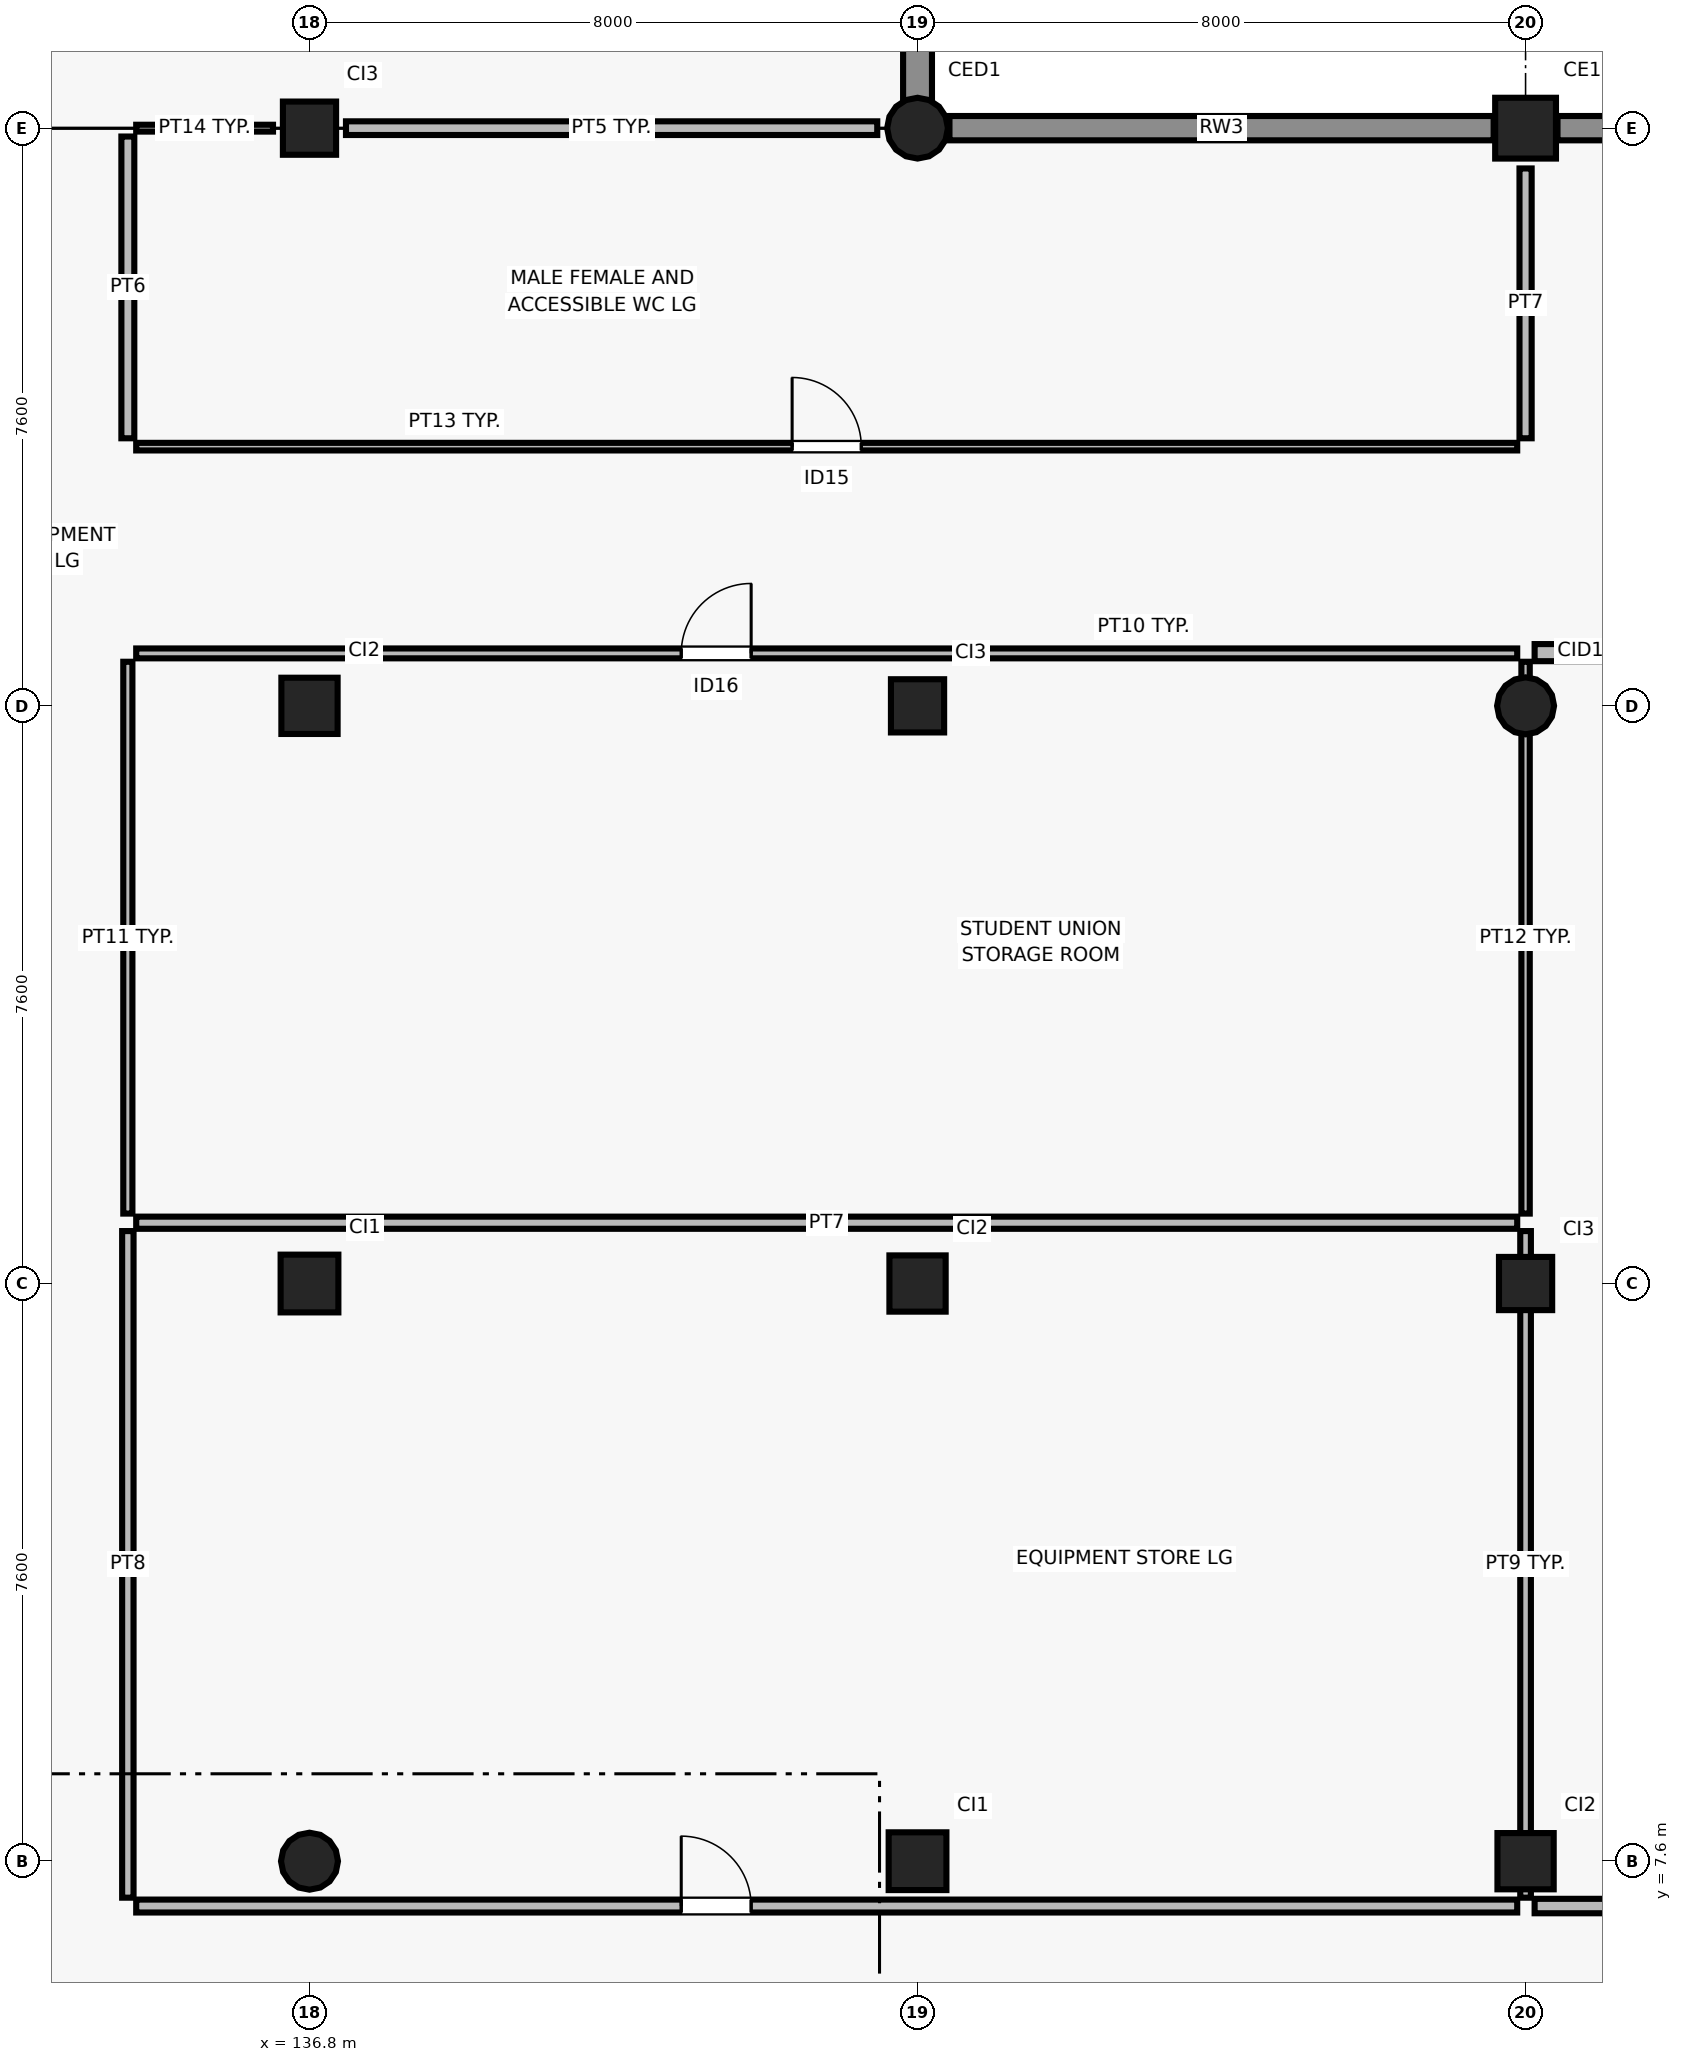
"""IFC4 building model, lengths in metres.
Left out: names, types, materials, properties, quantities, classifications, styles, units other than length and angle.
Written with IfcOpenShell. Run it as: python <this file> out.ifc"""

import sys

from ifc_helpers import new_model, si_unit, direction, frame, frame_2d, origin, origin_2d, place, context, subcontext, project, spatial, rectangle, circle, extrude, element, fill, save


model = new_model("IFC4")
c1 = context("Model", 3, precision=1e-05, world=origin(), true_north=direction((0.0, 1.0)))
c2 = subcontext(c1, "Body", "Model", "MODEL_VIEW")
j1 = project(units=[si_unit("LENGTHUNIT", "METRE"), si_unit("PLANEANGLEUNIT", "RADIAN")], contexts=[c1])
p1 = place(None, origin())
s1 = spatial("IfcSite", under=j1, at=p1, CompositionType="ELEMENT")
p2 = place(p1, origin())
s2 = spatial("IfcBuilding", under=s1, at=p2, CompositionType="ELEMENT")
p3 = place(p2, frame((0.0, 0.0, -4.2)))
s3 = spatial("IfcBuildingStorey", under=s2, at=p3, CompositionType="ELEMENT", Elevation=-4.2)
for number, where, z_axis, x_axis in (
    (1, (145.22, 30.4, 0.0), (0.0, 0.0, 1.0), (1.0, 0.0, 0.0)),
    (2, (153.22, 30.4, 0.0), (0.0, 0.0, 1.0), (1.0, 0.0, 0.0)),
):
    element("IfcWall", number, at=place(p3, frame(where, z_axis=z_axis, x_axis=x_axis)), inside=s3, PredefinedType="USERDEFINED", context=c2, shape_type="SweptSolid", body=[
        extrude(rectangle(XDim=7.16, YDim=0.32, at=frame_2d((3.58, 0.0))), origin(), (0.0, 0.0, 1.0), 3.25),
    ])
p4 = place(p3, frame((136.8, 7.6, 0.0), z_axis=(0.0, 0.0, 1.0), x_axis=(1.0, 0.0, 0.0)))
e3 = element("IfcColumn", 3, at=p4, inside=s3, PredefinedType="COLUMN", context=c2, shape_type="SweptSolid", body=[
    extrude(circle(Radius=0.375, at=origin_2d()), origin(), (0.0, 0.0, 1.0), 4.2),
])
p5 = place(p3, frame((136.8, 15.2, 0.0), z_axis=(0.0, 0.0, 1.0), x_axis=(1.0, 0.0, 0.0)))
e4 = element("IfcColumn", 4, at=p5, inside=s3, PredefinedType="COLUMN", context=c2, shape_type="SweptSolid", body=[
    extrude(rectangle(XDim=0.76, YDim=0.76, at=origin_2d()), origin(), (0.0, 0.0, 1.0), 4.2),
])
p6 = place(p3, frame((136.8, 22.8, 0.0), z_axis=(0.0, 0.0, 1.0), x_axis=(1.0, 0.0, 0.0)))
e5 = element("IfcColumn", 5, at=p6, inside=s3, PredefinedType="COLUMN", context=c2, shape_type="SweptSolid", body=[
    extrude(rectangle(XDim=0.74, YDim=0.74, at=origin_2d()), origin(), (0.0, 0.0, 1.0), 4.2),
])
p7 = place(p3, frame((136.8, 30.4, 0.0), z_axis=(0.0, 0.0, 1.0), x_axis=(1.0, 0.0, 0.0)))
e6 = element("IfcColumn", 6, at=p7, inside=s3, PredefinedType="COLUMN", context=c2, shape_type="SweptSolid", body=[
    extrude(rectangle(XDim=0.7, YDim=0.7, at=origin_2d()), origin(), (0.0, 0.0, 1.0), 4.2),
])
p8 = place(p3, frame((144.8, 7.6, 0.0), z_axis=(0.0, 0.0, 1.0), x_axis=(1.0, 0.0, 0.0)))
e7 = element("IfcColumn", 7, at=p8, inside=s3, PredefinedType="COLUMN", context=c2, shape_type="SweptSolid", body=[
    extrude(rectangle(XDim=0.76, YDim=0.76, at=origin_2d()), origin(), (0.0, 0.0, 1.0), 4.2),
])
p9 = place(p3, frame((144.8, 15.2, 0.0), z_axis=(0.0, 0.0, 1.0), x_axis=(1.0, 0.0, 0.0)))
e8 = element("IfcColumn", 8, at=p9, inside=s3, PredefinedType="COLUMN", context=c2, shape_type="SweptSolid", body=[
    extrude(rectangle(XDim=0.74, YDim=0.74, at=origin_2d()), origin(), (0.0, 0.0, 1.0), 4.2),
])
p10 = place(p3, frame((144.8, 22.8, 0.0), z_axis=(0.0, 0.0, 1.0), x_axis=(1.0, 0.0, 0.0)))
e9 = element("IfcColumn", 9, at=p10, inside=s3, PredefinedType="COLUMN", context=c2, shape_type="SweptSolid", body=[
    extrude(rectangle(XDim=0.7, YDim=0.7, at=origin_2d()), origin(), (0.0, 0.0, 1.0), 4.2),
])
p11 = place(p3, frame((144.8, 30.4, 0.0), z_axis=(0.0, 0.0, 1.0), x_axis=(1.0, 0.0, 0.0)))
e10 = element("IfcColumn", 10, at=p11, inside=s3, PredefinedType="COLUMN", context=c2, shape_type="SweptSolid", body=[
    extrude(circle(Radius=0.4, at=origin_2d()), origin(), (0.0, 0.0, 1.0), 4.2),
])
p12 = place(p3, frame((152.8, 7.6, 0.0), z_axis=(0.0, 0.0, 1.0), x_axis=(1.0, 0.0, 0.0)))
e11 = element("IfcColumn", 11, at=p12, inside=s3, PredefinedType="COLUMN", context=c2, shape_type="SweptSolid", body=[
    extrude(rectangle(XDim=0.74, YDim=0.74, at=origin_2d()), origin(), (0.0, 0.0, 1.0), 4.2),
])
p13 = place(p3, frame((152.8, 15.2, 0.0), z_axis=(0.0, 0.0, 1.0), x_axis=(1.0, 0.0, 0.0)))
e12 = element("IfcColumn", 12, at=p13, inside=s3, PredefinedType="COLUMN", context=c2, shape_type="SweptSolid", body=[
    extrude(rectangle(XDim=0.7, YDim=0.7, at=origin_2d()), origin(), (0.0, 0.0, 1.0), 4.2),
])
p14 = place(p3, frame((152.8, 22.8, 0.0), z_axis=(0.0, 0.0, 1.0), x_axis=(1.0, 0.0, 0.0)))
e13 = element("IfcColumn", 13, at=p14, inside=s3, PredefinedType="COLUMN", context=c2, shape_type="SweptSolid", body=[
    extrude(circle(Radius=0.375, at=origin_2d()), origin(), (0.0, 0.0, 1.0), 4.2),
])
p15 = place(p3, frame((152.8, 30.4, 0.0), z_axis=(0.0, 0.0, 1.0), x_axis=(1.0, 0.0, 0.0)))
e14 = element("IfcColumn", 14, at=p15, inside=s3, PredefinedType="COLUMN", context=c2, shape_type="SweptSolid", body=[
    extrude(rectangle(XDim=0.8, YDim=0.8, at=origin_2d()), origin(), (0.0, 0.0, 1.0), 4.2),
])
p16 = place(p3, frame((144.8, 30.736, 0.0), z_axis=(0.0, 0.0, 1.0), x_axis=(0.0, 1.0, 0.0)))
e15 = element("IfcWall", 15, at=p16, inside=s3, PredefinedType="SOLIDWALL", context=c2, shape_type="SweptSolid", body=[
    extrude(rectangle(XDim=6.869, YDim=0.38, at=frame_2d((3.435, 0.0))), origin(), (0.0, 0.0, 1.0), 3.275),
])
p17 = place(p16, frame((2.084, 0.0, 0.9)))
e16 = element("IfcOpeningElement", 16, at=p17, cuts=e15, PredefinedType="OPENING", context=c2, shape_type="SweptSolid", body=[
    extrude(rectangle(XDim=2.7, YDim=1.8, at=frame_2d((1.35, 0.9))), frame((0.0, 0.2, 0.0), z_axis=(0.0, -1.0, 0.0), x_axis=(1.0, 0.0, 0.0)), (0.0, 0.0, 1.0), 0.4),
])
p18 = place(p3, frame((134.52, 7.01, 0.0), z_axis=(0.0, 0.0, 1.0), x_axis=(1.0, 0.0, 0.0)))
e17 = element("IfcWall", 17, at=p18, inside=s3, PredefinedType="PARTITIONING", context=c2, shape_type="SweptSolid", body=[
    extrude(rectangle(XDim=18.17, YDim=0.17, at=frame_2d((9.085, 0.0))), origin(), (0.0, 0.0, 1.0), 3.9),
])
p19 = place(p18, frame((7.171, 0.0, 0.0)))
e18 = element("IfcOpeningElement", 18, at=p19, cuts=e17, PredefinedType="OPENING", context=c2, shape_type="SweptSolid", body=[
    extrude(rectangle(XDim=0.92, YDim=2.1, at=frame_2d((0.46, 1.05))), frame((0.0, 0.095, 0.0), z_axis=(0.0, -1.0, 0.0), x_axis=(1.0, 0.0, 0.0)), (0.0, 0.0, 1.0), 0.19),
])
p20 = place(p3, frame((134.52, 16.0, 0.0), z_axis=(0.0, 0.0, 1.0), x_axis=(1.0, 0.0, 0.0)))
e19 = element("IfcWall", 19, at=p20, inside=s3, PredefinedType="PARTITIONING", context=c2, shape_type="SweptSolid", body=[
    extrude(rectangle(XDim=18.17, YDim=0.16, at=frame_2d((9.085, 0.0))), origin(), (0.0, 0.0, 1.0), 3.9),
])
p21 = place(p3, frame((134.41, 7.12, 0.0), z_axis=(0.0, 0.0, 1.0), x_axis=(0.0, 1.0, 0.0)))
e20 = element("IfcWall", 20, at=p21, inside=s3, PredefinedType="PARTITIONING", context=c2, shape_type="SweptSolid", body=[
    extrude(rectangle(XDim=8.77, YDim=0.15, at=frame_2d((4.385, 0.0))), origin(), (0.0, 0.0, 1.0), 3.9),
])
p22 = place(p3, frame((152.8, 7.12, 0.0), z_axis=(0.0, 0.0, 1.0), x_axis=(0.0, 1.0, 0.0)))
e21 = element("IfcWall", 21, at=p22, inside=s3, PredefinedType="PARTITIONING", context=c2, shape_type="SweptSolid", body=[
    extrude(rectangle(XDim=8.77, YDim=0.14, at=frame_2d((4.385, 0.0))), origin(), (0.0, 0.0, 1.0), 3.315),
])
p23 = place(p3, frame((134.52, 23.49, 0.0), z_axis=(0.0, 0.0, 1.0), x_axis=(1.0, 0.0, 0.0)))
e22 = element("IfcWall", 22, at=p23, inside=s3, PredefinedType="PARTITIONING", context=c2, shape_type="SweptSolid", body=[
    extrude(rectangle(XDim=18.17, YDim=0.13, at=frame_2d((9.085, 0.0))), origin(), (0.0, 0.0, 1.0), 3.9),
])
p24 = place(p23, frame((7.171, 0.0, 0.0)))
e23 = element("IfcOpeningElement", 23, at=p24, cuts=e22, PredefinedType="OPENING", context=c2, shape_type="SweptSolid", body=[
    extrude(rectangle(XDim=0.92, YDim=2.1, at=frame_2d((0.46, 1.05))), frame((0.0, 0.075, 0.0), z_axis=(0.0, -1.0, 0.0), x_axis=(1.0, 0.0, 0.0)), (0.0, 0.0, 1.0), 0.15),
])
p25 = place(p3, frame((134.41, 16.12, 0.0), z_axis=(0.0, 0.0, 1.0), x_axis=(0.0, 1.0, 0.0)))
e24 = element("IfcWall", 24, at=p25, inside=s3, PredefinedType="PARTITIONING", context=c2, shape_type="SweptSolid", body=[
    extrude(rectangle(XDim=7.26, YDim=0.12, at=frame_2d((3.63, 0.0))), origin(), (0.0, 0.0, 1.0), 3.9),
])
p26 = place(p3, frame((152.8, 16.12, 0.0), z_axis=(0.0, 0.0, 1.0), x_axis=(0.0, 1.0, 0.0)))
e25 = element("IfcWall", 25, at=p26, inside=s3, PredefinedType="PARTITIONING", context=c2, shape_type="SweptSolid", body=[
    extrude(rectangle(XDim=7.26, YDim=0.11, at=frame_2d((3.63, 0.0))), origin(), (0.0, 0.0, 1.0), 3.345),
])
p27 = place(p3, frame((134.52, 26.21, 0.0), z_axis=(0.0, 0.0, 1.0), x_axis=(1.0, 0.0, 0.0)))
e26 = element("IfcWall", 26, at=p27, inside=s3, PredefinedType="PARTITIONING", context=c2, shape_type="SweptSolid", body=[
    extrude(rectangle(XDim=18.17, YDim=0.1, at=frame_2d((9.085, 0.0))), origin(), (0.0, 0.0, 1.0), 3.9),
])
p28 = place(p27, frame((8.63, 0.0, 0.0)))
e27 = element("IfcOpeningElement", 27, at=p28, cuts=e26, PredefinedType="OPENING", context=c2, shape_type="SweptSolid", body=[
    extrude(rectangle(XDim=0.91, YDim=2.1, at=frame_2d((0.455, 1.05))), frame((0.0, 0.06, 0.0), z_axis=(0.0, -1.0, 0.0), x_axis=(1.0, 0.0, 0.0)), (0.0, 0.0, 1.0), 0.12),
])
p29 = place(p3, frame((134.52, 30.4, 0.0), z_axis=(0.0, 0.0, 1.0), x_axis=(1.0, 0.0, 0.0)))
e28 = element("IfcWall", 28, at=p29, inside=s3, PredefinedType="PARTITIONING", context=c2, shape_type="SweptSolid", body=[
    extrude(rectangle(XDim=1.8, YDim=0.09, at=frame_2d((0.9, 0.0))), origin(), (0.0, 0.0, 1.0), 3.9),
])
p30 = place(p3, frame((137.28, 30.4, 0.0), z_axis=(0.0, 0.0, 1.0), x_axis=(1.0, 0.0, 0.0)))
e29 = element("IfcWall", 29, at=p30, inside=s3, PredefinedType="PARTITIONING", context=c2, shape_type="SweptSolid", body=[
    extrude(rectangle(XDim=6.99, YDim=0.18, at=frame_2d((3.495, 0.0))), origin(), (0.0, 0.0, 1.0), 3.045),
])
p31 = place(p3, frame((134.41, 26.32, 0.0), z_axis=(0.0, 0.0, 1.0), x_axis=(0.0, 1.0, 0.0)))
e30 = element("IfcWall", 30, at=p31, inside=s3, PredefinedType="PARTITIONING", context=c2, shape_type="SweptSolid", body=[
    extrude(rectangle(XDim=3.97, YDim=0.17, at=frame_2d((1.985, 0.0))), origin(), (0.0, 0.0, 1.0), 3.9),
])
p32 = place(p3, frame((152.8, 26.32, 0.0), z_axis=(0.0, 0.0, 1.0), x_axis=(0.0, 1.0, 0.0)))
e31 = element("IfcWall", 31, at=p32, inside=s3, PredefinedType="PARTITIONING", context=c2, shape_type="SweptSolid", body=[
    extrude(rectangle(XDim=3.55, YDim=0.16, at=frame_2d((1.775, 0.0))), origin(), (0.0, 0.0, 1.0), 3.115),
])
p33 = place(p3, frame((152.919, 7.01, 0.0), z_axis=(0.0, 0.0, 1.0), x_axis=(1.0, 0.0, 0.0)))
e32 = element("IfcWall", 32, at=p33, inside=s3, PredefinedType="PARTITIONING", context=c2, shape_type="SweptSolid", body=[
    extrude(rectangle(XDim=15.771, YDim=0.19, at=frame_2d((7.885, 0.0))), origin(), (0.0, 0.0, 1.0), 3.9),
])
p34 = place(p33, frame((4.902, 0.0, 0.0)))
e33 = element("IfcOpeningElement", 33, at=p34, cuts=e32, PredefinedType="OPENING", context=c2, shape_type="SweptSolid", body=[
    extrude(rectangle(XDim=0.92, YDim=2.1, at=frame_2d((0.46, 1.05))), frame((0.0, 0.105, 0.0), z_axis=(0.0, -1.0, 0.0), x_axis=(1.0, 0.0, 0.0)), (0.0, 0.0, 1.0), 0.21),
])
p35 = place(p3, frame((152.919, 23.5, 0.0), z_axis=(0.0, 0.0, 1.0), x_axis=(1.0, 0.0, 0.0)))
e34 = element("IfcWall", 34, at=p35, inside=s3, PredefinedType="PARTITIONING", context=c2, shape_type="SweptSolid", body=[
    extrude(rectangle(XDim=15.771, YDim=0.225, at=frame_2d((7.885, 0.0))), origin(), (0.0, 0.0, 1.0), 3.9),
])
p36 = place(p19, origin())
e35 = element("IfcDoor", 35, at=p36, inside=s3, OperationType="SINGLE_SWING_LEFT", PredefinedType="DOOR", context=c2, shape_type="SweptSolid", body=[
    extrude(rectangle(XDim=0.92, YDim=2.1, at=frame_2d((0.46, 1.05))), frame((0.0, 0.025, 0.0), z_axis=(0.0, -1.0, 0.0), x_axis=(1.0, 0.0, 0.0)), (0.0, 0.0, 1.0), 0.05),
])
fill(e18, e35)
p37 = place(p24, origin())
e36 = element("IfcDoor", 36, at=p37, inside=s3, OperationType="SINGLE_SWING_RIGHT", PredefinedType="DOOR", context=c2, shape_type="SweptSolid", body=[
    extrude(rectangle(XDim=0.92, YDim=2.1, at=frame_2d((0.46, 1.05))), frame((0.0, 0.025, 0.0), z_axis=(0.0, -1.0, 0.0), x_axis=(1.0, 0.0, 0.0)), (0.0, 0.0, 1.0), 0.05),
])
fill(e23, e36)
p38 = place(p28, origin())
e37 = element("IfcDoor", 37, at=p38, inside=s3, OperationType="SINGLE_SWING_LEFT", PredefinedType="DOOR", context=c2, shape_type="SweptSolid", body=[
    extrude(rectangle(XDim=0.91, YDim=2.1, at=frame_2d((0.455, 1.05))), frame((0.0, 0.025, 0.0), z_axis=(0.0, -1.0, 0.0), x_axis=(1.0, 0.0, 0.0)), (0.0, 0.0, 1.0), 0.05),
])
fill(e27, e37)
save(model, sys.argv[1])
